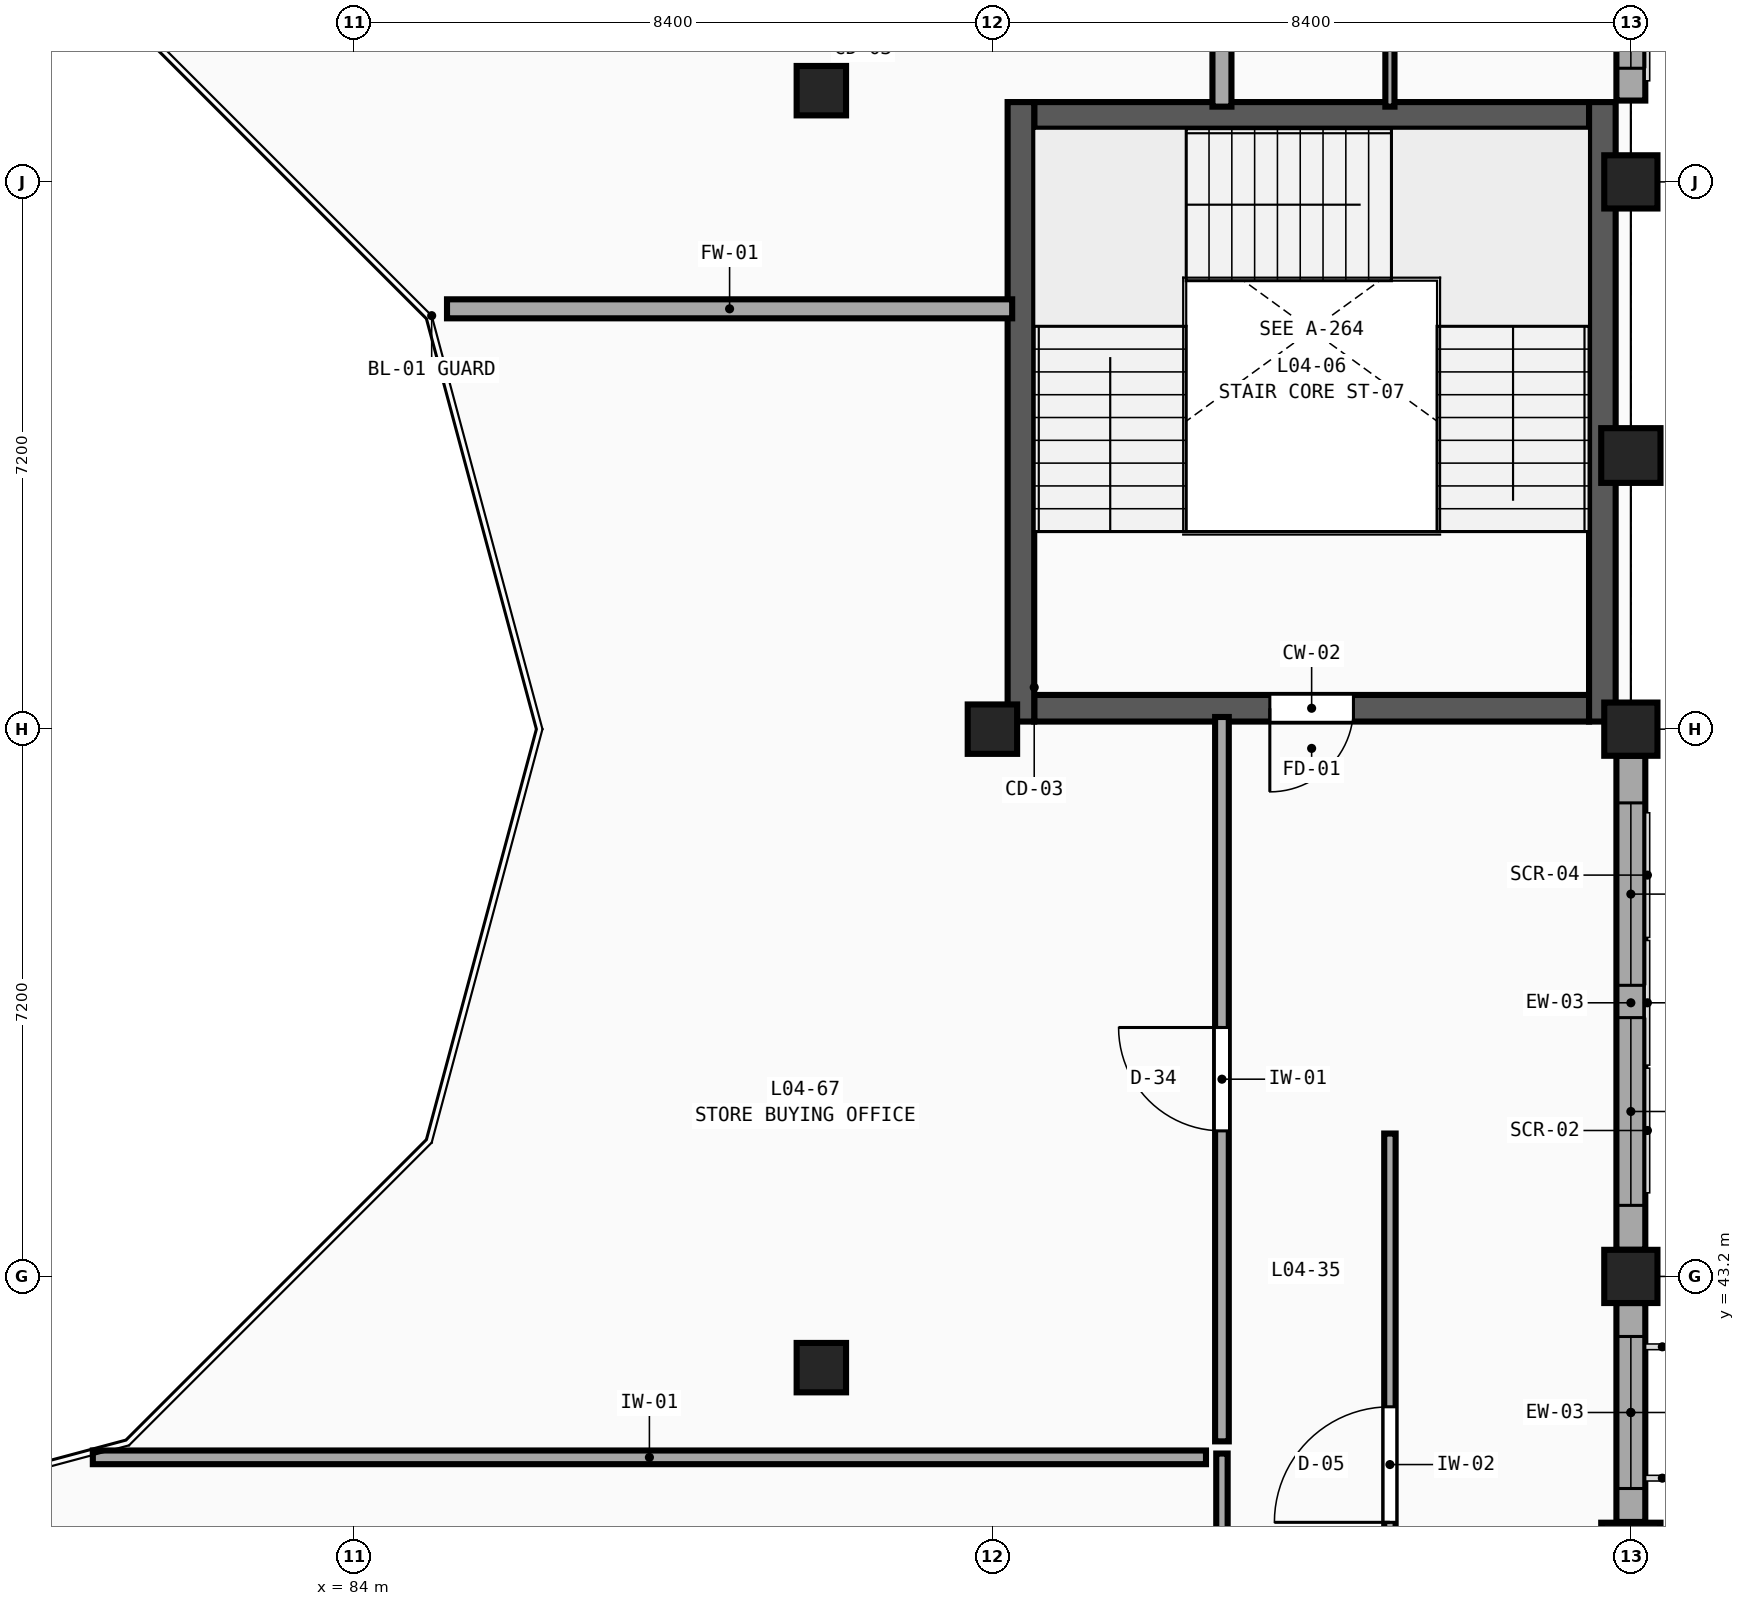
"""IFC4 building model, lengths in metres.
Left out: names, types, materials, properties, quantities, classifications, styles, units other than length and angle.
Written with IfcOpenShell. Run it as: python <this file> out.ifc"""

import sys

from ifc_helpers import new_model, si_unit, direction, frame, frame_2d, origin, origin_2d, place, context, subcontext, project, spatial, rectangle, circle, extrude, element, fill, save


model = new_model("IFC4")
c1 = context("Model", 3, precision=1e-05, world=origin(), true_north=direction((0.0, 1.0)))
c2 = subcontext(c1, "Body", "Model", "MODEL_VIEW")
j1 = project(units=[si_unit("LENGTHUNIT", "METRE"), si_unit("PLANEANGLEUNIT", "RADIAN")], contexts=[c1])
p1 = place(None, origin())
s1 = spatial("IfcSite", under=j1, at=p1, CompositionType="ELEMENT")
p2 = place(p1, origin())
s2 = spatial("IfcBuilding", under=s1, at=p2, CompositionType="ELEMENT")
p3 = place(p2, frame((0.0, 0.0, 18.9)))
s3 = spatial("IfcBuildingStorey", under=s2, at=p3, CompositionType="ELEMENT", Elevation=18.9)
for number, where, z_axis, x_axis in (
    (1, (100.8, 43.2, 0.0), (0.0, 0.0, 1.0), (1.0, 0.0, 0.0)),
    (2, (100.8, 50.4, 0.0), (0.0, 0.0, 1.0), (1.0, 0.0, 0.0)),
    (3, (100.8, 57.6, 0.0), (0.0, 0.0, 1.0), (1.0, 0.0, 0.0)),
):
    element("IfcColumn", number, at=place(p3, frame(where, z_axis=z_axis, x_axis=x_axis)), inside=s3, PredefinedType="COLUMN", context=c2, shape_type="SweptSolid", body=[
        extrude(rectangle(XDim=0.7, YDim=0.7, at=origin_2d()), origin(), (0.0, 0.0, 1.0), 4.5),
    ])
for number, where, z_axis, x_axis in (
    (4, (100.8, 39.6, 0.0), (0.0, 0.0, 1.0), (1.0, 0.0, 0.0)),
    (5, (100.8, 54.0, 0.0), (0.0, 0.0, 1.0), (1.0, 0.0, 0.0)),
):
    element("IfcColumn", number, at=place(p3, frame(where, z_axis=z_axis, x_axis=x_axis)), inside=s3, PredefinedType="PILASTER", context=c2, shape_type="SweptSolid", body=[
        extrude(rectangle(XDim=0.78, YDim=0.72, at=origin_2d()), origin(), (0.0, 0.0, 1.0), 4.5),
    ])
for number, where, z_axis, x_axis in (
    (6, (92.4, 50.4, 0.0), (0.0, 0.0, 1.0), (1.0, 0.0, 0.0)),
    (7, (90.149, 58.8, 0.0), (0.0, 0.0, 1.0), (1.0, 0.0, 0.0)),
    (8, (90.149, 42.0, 0.0), (0.0, 0.0, 1.0), (1.0, 0.0, 0.0)),
):
    element("IfcColumn", number, at=place(p3, frame(where, z_axis=z_axis, x_axis=x_axis)), inside=s3, PredefinedType="COLUMN", context=c2, shape_type="SweptSolid", body=[
        extrude(circle(Radius=0.325, at=origin_2d()), origin(), (0.0, 0.0, 1.0), 4.5),
    ])
p4 = place(p3, frame((100.8, 42.85, 0.0), z_axis=(0.0, 0.0, 1.0), x_axis=(0.0, -1.0, 0.0)))
e9 = element("IfcWall", 9, at=p4, inside=s3, PredefinedType="SOLIDWALL", context=c2, shape_type="SweptSolid", body=[
    extrude(rectangle(XDim=2.88, YDim=0.38, at=frame_2d((1.44, 0.0))), origin(), (0.0, 0.0, 1.0), 3.63),
])
p5 = place(p4, frame((0.44, 0.0, 0.75)))
e10 = element("IfcOpeningElement", 10, at=p5, cuts=e9, PredefinedType="OPENING", context=c2, shape_type="SweptSolid", body=[
    extrude(rectangle(XDim=2.0, YDim=2.62, at=frame_2d((1.0, 1.31))), frame((0.0, 0.21, 0.0), z_axis=(0.0, -1.0, 0.0), x_axis=(1.0, 0.0, 0.0)), (0.0, 0.0, 1.0), 0.42),
])
p6 = place(p3, frame((100.8, 50.05, 0.0), z_axis=(0.0, 0.0, 1.0), x_axis=(0.0, -1.0, 0.0)))
e11 = element("IfcWall", 11, at=p6, inside=s3, PredefinedType="SOLIDWALL", context=c2, shape_type="SweptSolid", body=[
    extrude(rectangle(XDim=6.5, YDim=0.38, at=frame_2d((3.25, 0.0))), origin(), (0.0, 0.0, 1.0), 3.63),
])
p7 = place(p6, frame((0.62, 0.0, 0.75)))
e12 = element("IfcOpeningElement", 12, at=p7, cuts=e11, PredefinedType="OPENING", context=c2, shape_type="SweptSolid", body=[
    extrude(rectangle(XDim=2.4, YDim=2.62, at=frame_2d((1.2, 1.31))), frame((0.0, 0.21, 0.0), z_axis=(0.0, -1.0, 0.0), x_axis=(1.0, 0.0, 0.0)), (0.0, 0.0, 1.0), 0.42),
])
p8 = place(p6, frame((3.445, 0.0, 0.75)))
e13 = element("IfcOpeningElement", 13, at=p8, cuts=e11, PredefinedType="OPENING", context=c2, shape_type="SweptSolid", body=[
    extrude(rectangle(XDim=2.47, YDim=2.62, at=frame_2d((1.235, 1.31))), frame((0.0, 0.21, 0.0), z_axis=(0.0, -1.0, 0.0), x_axis=(1.0, 0.0, 0.0)), (0.0, 0.0, 1.0), 0.42),
])
p9 = place(p3, frame((100.8, 60.83, 0.0), z_axis=(0.0, 0.0, 1.0), x_axis=(0.0, -1.0, 0.0)))
e14 = element("IfcWall", 14, at=p9, inside=s3, PredefinedType="SOLIDWALL", context=c2, shape_type="SweptSolid", body=[
    extrude(rectangle(XDim=2.16, YDim=0.38, at=frame_2d((1.08, 0.0))), origin(), (0.0, 0.0, 1.0), 3.63),
])
p10 = place(p9, frame((0.425, 0.0, 0.75)))
e15 = element("IfcOpeningElement", 15, at=p10, cuts=e14, PredefinedType="OPENING", context=c2, shape_type="SweptSolid", body=[
    extrude(rectangle(XDim=1.31, YDim=2.73, at=frame_2d((0.655, 1.365))), frame((0.0, 0.21, 0.0), z_axis=(0.0, -1.0, 0.0), x_axis=(1.0, 0.0, 0.0)), (0.0, 0.0, 1.0), 0.42),
])
p11 = place(p3, frame((100.25, 50.675, 0.0), z_axis=(0.0, 0.0, 1.0), x_axis=(-1.0, 0.0, 0.0)))
e16 = element("IfcWall", 16, at=p11, inside=s3, PredefinedType="SHEAR", context=c2, shape_type="SweptSolid", body=[
    extrude(rectangle(XDim=7.3, YDim=0.35, at=frame_2d((3.65, 0.0))), origin(), (0.0, 0.0, 1.0), 4.5),
])
p12 = place(p11, frame((3.1, 0.0, 0.0)))
e17 = element("IfcOpeningElement", 17, at=p12, cuts=e16, PredefinedType="OPENING", context=c2, shape_type="SweptSolid", body=[
    extrude(rectangle(XDim=1.1, YDim=2.2, at=frame_2d((0.55, 1.1))), frame((0.0, 0.195, 0.0), z_axis=(0.0, -1.0, 0.0), x_axis=(1.0, 0.0, 0.0)), (0.0, 0.0, 1.0), 0.39),
])
p13 = place(p3, frame((92.95, 58.475, 0.0), z_axis=(0.0, 0.0, 1.0), x_axis=(1.0, 0.0, 0.0)))
e18 = element("IfcWall", 18, at=p13, inside=s3, PredefinedType="SHEAR", context=c2, shape_type="SweptSolid", body=[
    extrude(rectangle(XDim=7.3, YDim=0.35, at=frame_2d((3.65, 0.0))), origin(), (0.0, 0.0, 1.0), 4.5),
])
for number, where, z_axis, x_axis in (
    (19, (92.775, 58.65, 0.0), (0.0, 0.0, 1.0), (0.0, -1.0, 0.0)),
    (20, (100.425, 50.5, 0.0), (0.0, 0.0, 1.0), (0.0, 1.0, 0.0)),
):
    element("IfcWall", number, at=place(p3, frame(where, z_axis=z_axis, x_axis=x_axis)), inside=s3, PredefinedType="SHEAR", context=c2, shape_type="SweptSolid", body=[
        extrude(rectangle(XDim=8.15, YDim=0.35, at=frame_2d((4.075, 0.0))), origin(), (0.0, 0.0, 1.0), 4.5),
    ])
p14 = place(p3, frame((97.63, 58.59, 0.0), z_axis=(0.0, 0.0, 1.0), x_axis=(0.0, 1.0, 0.0)))
e21 = element("IfcWall", 21, at=p14, inside=s3, PredefinedType="PARTITIONING", context=c2, shape_type="SweptSolid", body=[
    extrude(rectangle(XDim=9.63, YDim=0.12, at=frame_2d((4.815, 0.0))), origin(), (0.0, 0.0, 1.0), 4.18),
])
p15 = place(p14, frame((4.215, 0.0, 0.0)))
e22 = element("IfcOpeningElement", 22, at=p15, cuts=e21, PredefinedType="OPENING", context=c2, shape_type="SweptSolid", body=[
    extrude(rectangle(XDim=1.2, YDim=2.45, at=frame_2d((0.6, 1.225))), frame((0.0, 0.08, 0.0), z_axis=(0.0, -1.0, 0.0), x_axis=(1.0, 0.0, 0.0)), (0.0, 0.0, 1.0), 0.16),
])
p16 = place(p3, frame((95.42, 41.03, 0.0), z_axis=(0.0, 0.0, 1.0), x_axis=(0.0, 1.0, 0.0)))
e23 = element("IfcWall", 23, at=p16, inside=s3, PredefinedType="PARTITIONING", context=c2, shape_type="SweptSolid", body=[
    extrude(rectangle(XDim=9.53, YDim=0.18, at=frame_2d((4.765, 0.0))), origin(), (0.0, 0.0, 1.0), 4.18),
])
p17 = place(p16, frame((4.085, 0.0, 0.0)))
e24 = element("IfcOpeningElement", 24, at=p17, cuts=e23, PredefinedType="OPENING", context=c2, shape_type="SweptSolid", body=[
    extrude(rectangle(XDim=1.36, YDim=2.45, at=frame_2d((0.68, 1.225))), frame((0.0, 0.11, 0.0), z_axis=(0.0, -1.0, 0.0), x_axis=(1.0, 0.0, 0.0)), (0.0, 0.0, 1.0), 0.22),
])
p18 = place(p3, frame((95.42, 58.59, 0.0), z_axis=(0.0, 0.0, 1.0), x_axis=(0.0, 1.0, 0.0)))
e25 = element("IfcWall", 25, at=p18, inside=s3, PredefinedType="SOLIDWALL", context=c2, shape_type="SweptSolid", body=[
    extrude(rectangle(XDim=9.47, YDim=0.25, at=frame_2d((4.735, 0.0))), origin(), (0.0, 0.0, 1.0), 4.18),
])
p19 = place(p18, frame((3.835, 0.0, 0.0)))
e26 = element("IfcOpeningElement", 26, at=p19, cuts=e25, PredefinedType="OPENING", context=c2, shape_type="SweptSolid", body=[
    extrude(rectangle(XDim=1.8, YDim=2.3, at=frame_2d((0.9, 1.15))), frame((0.0, 0.145, 0.0), z_axis=(0.0, -1.0, 0.0), x_axis=(1.0, 0.0, 0.0)), (0.0, 0.0, 1.0), 0.29),
])
p20 = place(p3, frame((97.63, 36.37, 0.0), z_axis=(0.0, 0.0, 1.0), x_axis=(0.0, 1.0, 0.0)))
e27 = element("IfcWall", 27, at=p20, inside=s3, PredefinedType="PARTITIONING", context=c2, shape_type="SweptSolid", body=[
    extrude(rectangle(XDim=8.71, YDim=0.15, at=frame_2d((4.355, 0.0))), origin(), (0.0, 0.0, 1.0), 4.18),
])
p21 = place(p20, frame((3.595, 0.0, 0.0)))
e28 = element("IfcOpeningElement", 28, at=p21, cuts=e27, PredefinedType="OPENING", context=c2, shape_type="SweptSolid", body=[
    extrude(rectangle(XDim=1.52, YDim=2.05, at=frame_2d((0.76, 1.025))), frame((0.0, 0.095, 0.0), z_axis=(0.0, -1.0, 0.0), x_axis=(1.0, 0.0, 0.0)), (0.0, 0.0, 1.0), 0.19),
])
p22 = place(p3, frame((95.42, 36.37, 0.0), z_axis=(0.0, 0.0, 1.0), x_axis=(0.0, 1.0, 0.0)))
e29 = element("IfcWall", 29, at=p22, inside=s3, PredefinedType="PARTITIONING", context=c2, shape_type="SweptSolid", body=[
    extrude(rectangle(XDim=4.5, YDim=0.15, at=frame_2d((2.25, 0.0))), origin(), (0.0, 0.0, 1.0), 4.18),
])
p23 = place(p22, frame((1.49, 0.0, 0.0)))
e30 = element("IfcOpeningElement", 30, at=p23, cuts=e29, PredefinedType="OPENING", context=c2, shape_type="SweptSolid", body=[
    extrude(rectangle(XDim=1.52, YDim=2.13, at=frame_2d((0.76, 1.065))), frame((0.0, 0.095, 0.0), z_axis=(0.0, -1.0, 0.0), x_axis=(1.0, 0.0, 0.0)), (0.0, 0.0, 1.0), 0.19),
])
p24 = place(p3, frame((80.564, 40.82, 0.0), z_axis=(0.0, 0.0, 1.0), x_axis=(1.0, 0.0, 0.0)))
e31 = element("IfcWall", 31, at=p24, inside=s3, PredefinedType="PARTITIONING", context=c2, shape_type="SweptSolid", body=[
    extrude(rectangle(XDim=14.646, YDim=0.18, at=frame_2d((7.323, 0.0))), origin(), (0.0, 0.0, 1.0), 4.18),
])
p25 = place(p3, frame((85.224, 55.93, 0.0), z_axis=(0.0, 0.0, 1.0), x_axis=(1.0, 0.0, 0.0)))
e32 = element("IfcWall", 32, at=p25, inside=s3, PredefinedType="SOLIDWALL", context=c2, shape_type="SweptSolid", body=[
    extrude(rectangle(XDim=7.436, YDim=0.25, at=frame_2d((3.718, 0.0))), origin(), (0.0, 0.0, 1.0), 4.18),
])
p26 = place(p5, origin())
e33 = element("IfcWindow", 33, at=p26, inside=s3, PartitioningType="TRIPLE_PANEL_VERTICAL", PredefinedType="WINDOW", context=c2, shape_type="SweptSolid", body=[
    extrude(rectangle(XDim=2.0, YDim=2.62, at=frame_2d((1.0, 1.31))), frame((0.0, 0.03, 0.0), z_axis=(0.0, -1.0, 0.0), x_axis=(1.0, 0.0, 0.0)), (0.0, 0.0, 1.0), 0.06),
])
fill(e10, e33)
p27 = place(p7, origin())
e34 = element("IfcWindow", 34, at=p27, inside=s3, PartitioningType="TRIPLE_PANEL_VERTICAL", PredefinedType="WINDOW", context=c2, shape_type="SweptSolid", body=[
    extrude(rectangle(XDim=2.4, YDim=2.62, at=frame_2d((1.2, 1.31))), frame((0.0, 0.03, 0.0), z_axis=(0.0, -1.0, 0.0), x_axis=(1.0, 0.0, 0.0)), (0.0, 0.0, 1.0), 0.06),
])
fill(e12, e34)
p28 = place(p8, origin())
e35 = element("IfcWindow", 35, at=p28, inside=s3, PartitioningType="TRIPLE_PANEL_VERTICAL", PredefinedType="WINDOW", context=c2, shape_type="SweptSolid", body=[
    extrude(rectangle(XDim=2.47, YDim=2.62, at=frame_2d((1.235, 1.31))), frame((0.0, 0.03, 0.0), z_axis=(0.0, -1.0, 0.0), x_axis=(1.0, 0.0, 0.0)), (0.0, 0.0, 1.0), 0.06),
])
fill(e13, e35)
p29 = place(p10, origin())
e36 = element("IfcWindow", 36, at=p29, inside=s3, PartitioningType="DOUBLE_PANEL_VERTICAL", PredefinedType="WINDOW", context=c2, shape_type="SweptSolid", body=[
    extrude(rectangle(XDim=1.31, YDim=2.73, at=frame_2d((0.655, 1.365))), frame((0.0, 0.03, 0.0), z_axis=(0.0, -1.0, 0.0), x_axis=(1.0, 0.0, 0.0)), (0.0, 0.0, 1.0), 0.06),
])
fill(e15, e36)
p30 = place(p12, origin())
e37 = element("IfcDoor", 37, at=p30, inside=s3, OperationType="SINGLE_SWING_RIGHT", PredefinedType="DOOR", context=c2, shape_type="SweptSolid", body=[
    extrude(rectangle(XDim=1.1, YDim=2.2, at=frame_2d((0.55, 1.1))), frame((0.0, 0.025, 0.0), z_axis=(0.0, -1.0, 0.0), x_axis=(1.0, 0.0, 0.0)), (0.0, 0.0, 1.0), 0.05),
])
fill(e17, e37)
p31 = place(p17, origin())
e38 = element("IfcDoor", 38, at=p31, inside=s3, OperationType="SINGLE_SWING_RIGHT", PredefinedType="DOOR", context=c2, shape_type="SweptSolid", body=[
    extrude(rectangle(XDim=1.36, YDim=2.45, at=frame_2d((0.68, 1.225))), frame((0.0, 0.025, 0.0), z_axis=(0.0, -1.0, 0.0), x_axis=(1.0, 0.0, 0.0)), (0.0, 0.0, 1.0), 0.05),
])
fill(e24, e38)
p32 = place(p21, origin())
e39 = element("IfcDoor", 39, at=p32, inside=s3, OperationType="SINGLE_SWING_LEFT", PredefinedType="DOOR", context=c2, shape_type="SweptSolid", body=[
    extrude(rectangle(XDim=1.52, YDim=2.05, at=frame_2d((0.76, 1.025))), frame((0.0, 0.025, 0.0), z_axis=(0.0, -1.0, 0.0), x_axis=(1.0, 0.0, 0.0)), (0.0, 0.0, 1.0), 0.05),
])
fill(e28, e39)
save(model, sys.argv[1])
